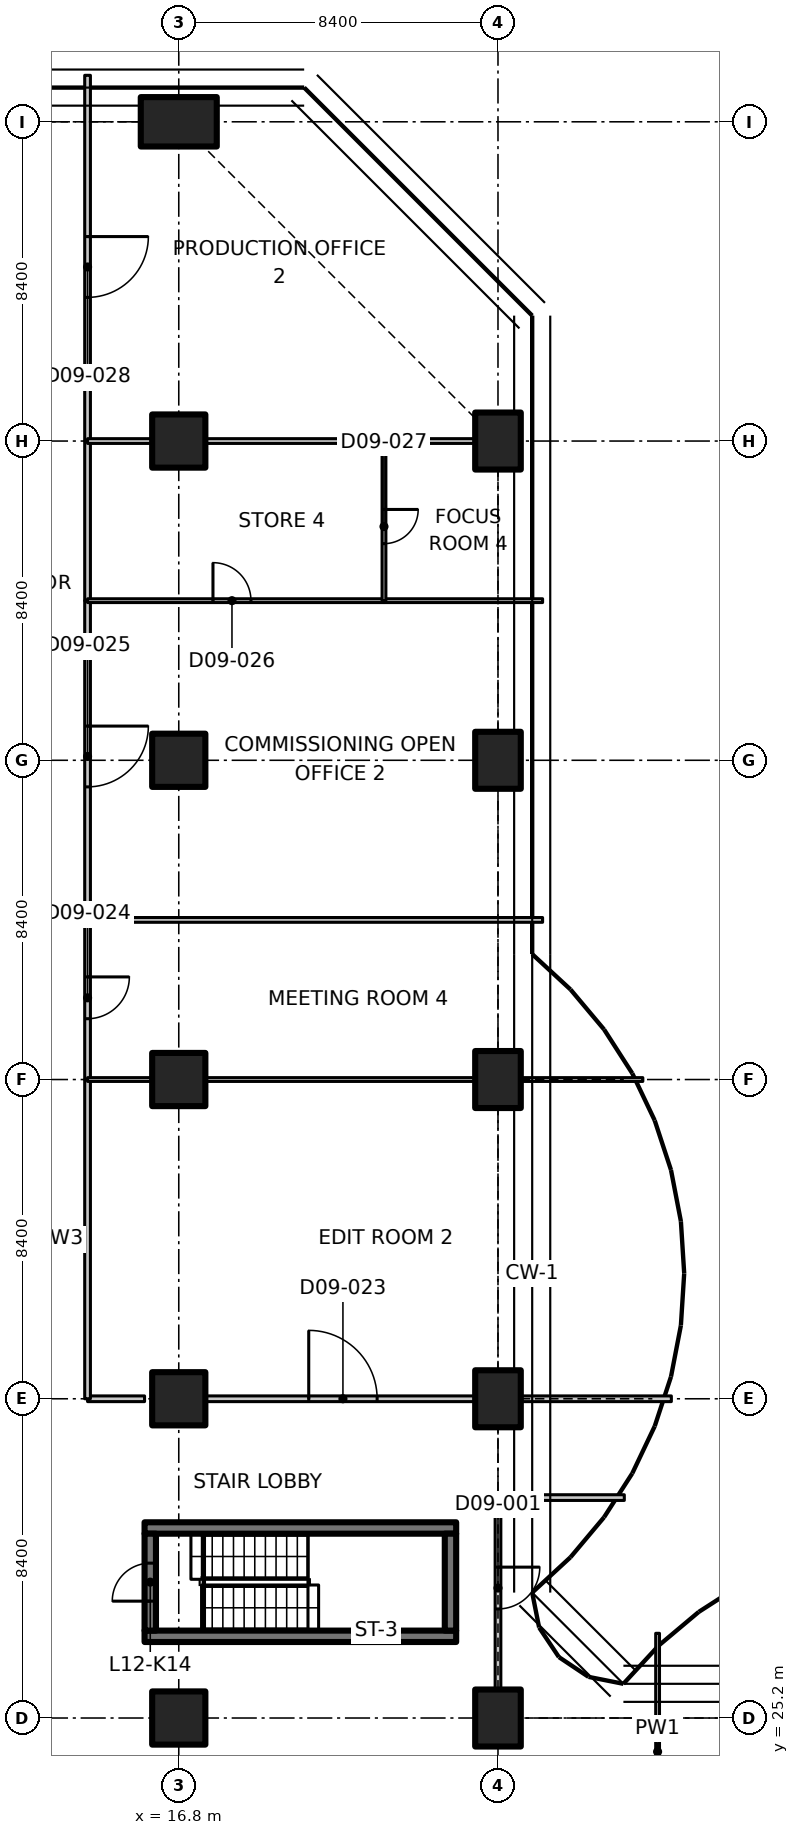
"""IFC4 building model, lengths in metres.
Left out: names, types, materials, properties, quantities, classifications, styles, units other than length and angle.
Written with IfcOpenShell. Run it as: python <this file> out.ifc"""

import sys

from ifc_helpers import new_model, si_unit, direction, frame, frame_2d, origin, origin_2d, place, context, subcontext, project, spatial, polyline, rectangle, outline, extrude, element, fill, save


model = new_model("IFC4")
c1 = context("Model", 3, precision=1e-05, world=origin(), true_north=direction((0.0, 1.0)))
c2 = subcontext(c1, "Body", "Model", "MODEL_VIEW")
j1 = project(units=[si_unit("LENGTHUNIT", "METRE"), si_unit("PLANEANGLEUNIT", "RADIAN")], contexts=[c1])
p1 = place(None, origin())
s1 = spatial("IfcSite", under=j1, at=p1, CompositionType="ELEMENT")
p2 = place(p1, origin())
s2 = spatial("IfcBuilding", under=s1, at=p2, CompositionType="ELEMENT")
p3 = place(p2, frame((0.0, 0.0, 58.1)))
s3 = spatial("IfcBuildingStorey", under=s2, at=p3, CompositionType="ELEMENT", Elevation=58.1)
for number, where, z_axis, x_axis in (
    (1, (16.8, 25.2, 0.0), (0.0, 0.0, 1.0), (1.0, 0.0, 0.0)),
    (2, (16.8, 33.6, 0.0), (0.0, 0.0, 1.0), (1.0, 0.0, 0.0)),
    (3, (16.8, 42.0, 0.0), (0.0, 0.0, 1.0), (1.0, 0.0, 0.0)),
    (4, (16.8, 50.4, 0.0), (0.0, 0.0, 1.0), (1.0, 0.0, 0.0)),
    (5, (16.8, 58.8, 0.0), (0.0, 0.0, 1.0), (1.0, 0.0, 0.0)),
):
    element("IfcColumn", number, at=place(p3, frame(where, z_axis=z_axis, x_axis=x_axis)), inside=s3, PredefinedType="COLUMN", context=c2, shape_type="SweptSolid", body=[
        extrude(rectangle(XDim=1.4, YDim=1.4, at=origin_2d()), origin(), (0.0, 0.0, 1.0), 3.35),
    ])
p4 = place(p3, frame((16.8, 67.2, 0.0), z_axis=(0.0, 0.0, 1.0), x_axis=(0.0, 1.0, 0.0)))
e6 = element("IfcColumn", 6, at=p4, inside=s3, PredefinedType="COLUMN", context=c2, shape_type="SweptSolid", body=[
    extrude(rectangle(XDim=1.3, YDim=2.0, at=origin_2d()), origin(), (0.0, 0.0, 1.0), 3.35),
])
for number, where, z_axis, x_axis in (
    (7, (25.2, 25.2, 0.0), (0.0, 0.0, 1.0), (1.0, 0.0, 0.0)),
    (8, (25.2, 33.6, 0.0), (0.0, 0.0, 1.0), (1.0, 0.0, 0.0)),
    (9, (25.2, 42.0, 0.0), (0.0, 0.0, 1.0), (1.0, 0.0, 0.0)),
    (10, (25.2, 50.4, 0.0), (0.0, 0.0, 1.0), (1.0, 0.0, 0.0)),
    (11, (25.2, 58.8, 0.0), (0.0, 0.0, 1.0), (1.0, 0.0, 0.0)),
):
    element("IfcColumn", number, at=place(p3, frame(where, z_axis=z_axis, x_axis=x_axis)), inside=s3, PredefinedType="COLUMN", context=c2, shape_type="SweptSolid", body=[
        extrude(rectangle(XDim=1.2, YDim=1.5, at=origin_2d()), origin(), (0.0, 0.0, 1.0), 3.35),
    ])
for number, where, z_axis, x_axis in (
    (12, (15.9, 27.35, 0.0), (0.0, 0.0, 1.0), (1.0, 0.0, 0.0)),
    (13, (15.9, 30.2, 0.0), (0.0, 0.0, 1.0), (1.0, 0.0, 0.0)),
):
    element("IfcWall", number, at=place(p3, frame(where, z_axis=z_axis, x_axis=x_axis)), inside=s3, PredefinedType="SHEAR", context=c2, shape_type="SweptSolid", body=[
        extrude(rectangle(XDim=8.2, YDim=0.3, at=frame_2d((4.1, 0.0))), origin(), (0.0, 0.0, 1.0), 3.35),
    ])
p5 = place(p3, frame((16.05, 27.5, 0.0), z_axis=(0.0, 0.0, 1.0), x_axis=(0.0, 1.0, 0.0)))
e14 = element("IfcWall", 14, at=p5, inside=s3, PredefinedType="SHEAR", context=c2, shape_type="SweptSolid", body=[
    extrude(rectangle(XDim=2.55, YDim=0.3, at=frame_2d((1.275, 0.0))), origin(), (0.0, 0.0, 1.0), 3.35),
])
p6 = place(p5, frame((0.775, 0.0, 0.0)))
e15 = element("IfcOpeningElement", 15, at=p6, cuts=e14, PredefinedType="OPENING", context=c2, shape_type="SweptSolid", body=[
    extrude(rectangle(XDim=1.0, YDim=2.1, at=frame_2d((0.5, 1.05))), frame((0.0, 0.16, 0.0), z_axis=(0.0, -1.0, 0.0), x_axis=(1.0, 0.0, 0.0)), (0.0, 0.0, 1.0), 0.32),
])
p7 = place(p3, frame((23.95, 27.5, 0.0), z_axis=(0.0, 0.0, 1.0), x_axis=(0.0, 1.0, 0.0)))
e16 = element("IfcWall", 16, at=p7, inside=s3, PredefinedType="SHEAR", context=c2, shape_type="SweptSolid", body=[
    extrude(rectangle(XDim=2.55, YDim=0.3, at=frame_2d((1.275, 0.0))), origin(), (0.0, 0.0, 1.0), 3.35),
])
p8 = place(p3, frame((29.4, 27.429, 0.0), z_axis=(0.0, 0.0, 1.0), x_axis=(0.0, -1.0, 0.0)))
e17 = element("IfcWall", 17, at=p8, inside=s3, PredefinedType="PARTITIONING", context=c2, shape_type="SweptSolid", body=[
    extrude(outline(polyline([(0.0, 0.0), (6.229, 0.0), (6.229, 3.33), (2.679, 3.33), (2.677, 2.98), (1.781, 2.98), (1.779, 3.33), (0.154, 3.33), (0.0, 3.33), (0.0, 0.0)])), frame((0.0, 0.05, 0.0), z_axis=(0.0, -1.0, 0.0), x_axis=(1.0, 0.0, 0.0)), (0.0, 0.0, 1.0), 0.1),
])
p9 = place(p3, frame((25.2, 31.0, 0.0), z_axis=(0.0, 0.0, 1.0), x_axis=(0.0, -1.0, 0.0)))
e18 = element("IfcWall", 18, at=p9, inside=s3, PredefinedType="PARTITIONING", context=c2, shape_type="SweptSolid", body=[
    extrude(outline(polyline([(0.0, 0.0), (5.03, 0.0), (5.03, 2.98), (0.0, 2.98), (0.0, 0.0)])), frame((0.0, 0.075, 0.0), z_axis=(0.0, -1.0, 0.0), x_axis=(1.0, 0.0, 0.0)), (0.0, 0.0, 1.0), 0.15),
])
p10 = place(p9, frame((1.83, 0.0, 0.0)))
e19 = element("IfcOpeningElement", 19, at=p10, cuts=e18, PredefinedType="OPENING", context=c2, shape_type="SweptSolid", body=[
    extrude(rectangle(XDim=1.1, YDim=2.1, at=frame_2d((0.55, 1.05))), frame((0.0, 0.085, 0.0), z_axis=(0.0, -1.0, 0.0), x_axis=(1.0, 0.0, 0.0)), (0.0, 0.0, 1.0), 0.17),
])
p11 = place(p3, frame((25.2, 31.0, 0.0), z_axis=(0.0, 0.0, 1.0), x_axis=(1.0, 0.0, 0.0)))
e20 = element("IfcWall", 20, at=p11, inside=s3, PredefinedType="PARTITIONING", context=c2, shape_type="SweptSolid", body=[
    extrude(rectangle(XDim=3.324, YDim=0.15, at=frame_2d((1.662, 0.0))), origin(), (0.0, 0.0, 1.0), 2.98),
])
p12 = place(p3, frame((14.4, 33.6, 0.0), z_axis=(0.0, 0.0, 1.0), x_axis=(1.0, 0.0, 0.0)))
e21 = element("IfcWall", 21, at=p12, inside=s3, PredefinedType="PARTITIONING", context=c2, shape_type="SweptSolid", body=[
    extrude(rectangle(XDim=1.5, YDim=0.15, at=frame_2d((0.75, 0.0))), origin(), (0.0, 0.0, 1.0), 3.33),
])
p13 = place(p3, frame((17.52, 33.6, 0.0), z_axis=(0.0, 0.0, 1.0), x_axis=(1.0, 0.0, 0.0)))
e22 = element("IfcWall", 22, at=p13, inside=s3, PredefinedType="PARTITIONING", context=c2, shape_type="SweptSolid", body=[
    extrude(rectangle(XDim=7.06, YDim=0.15, at=frame_2d((3.53, 0.0))), origin(), (0.0, 0.0, 1.0), 3.33),
])
p14 = place(p13, frame((2.7, 0.0, 0.0)))
e23 = element("IfcOpeningElement", 23, at=p14, cuts=e22, PredefinedType="OPENING", context=c2, shape_type="SweptSolid", body=[
    extrude(rectangle(XDim=1.8, YDim=2.1, at=frame_2d((0.9, 1.05))), frame((0.0, 0.085, 0.0), z_axis=(0.0, -1.0, 0.0), x_axis=(1.0, 0.0, 0.0)), (0.0, 0.0, 1.0), 0.17),
])
p15 = place(p3, frame((25.82, 33.6, 0.0), z_axis=(0.0, 0.0, 1.0), x_axis=(1.0, 0.0, 0.0)))
e24 = element("IfcWall", 24, at=p15, inside=s3, PredefinedType="PARTITIONING", context=c2, shape_type="SweptSolid", body=[
    extrude(rectangle(XDim=3.942, YDim=0.15, at=frame_2d((1.971, 0.0))), origin(), (0.0, 0.0, 1.0), 2.98),
])
p16 = place(p3, frame((14.4, 42.0, 0.0), z_axis=(0.0, 0.0, 1.0), x_axis=(0.0, -1.0, 0.0)))
e25 = element("IfcWall", 25, at=p16, inside=s3, PredefinedType="PARTITIONING", context=c2, shape_type="SweptSolid", body=[
    extrude(rectangle(XDim=8.4, YDim=0.15, at=frame_2d((4.2, 0.0))), origin(), (0.0, 0.0, 1.0), 3.33),
])
p17 = place(p3, frame((14.4, 46.2, 0.0), z_axis=(0.0, 0.0, 1.0), x_axis=(0.0, -1.0, 0.0)))
e26 = element("IfcWall", 26, at=p17, inside=s3, PredefinedType="PARTITIONING", context=c2, shape_type="SweptSolid", body=[
    extrude(rectangle(XDim=4.2, YDim=0.15, at=frame_2d((2.1, 0.0))), origin(), (0.0, 0.0, 1.0), 3.33),
])
p18 = place(p17, frame((1.5, 0.0, 0.0)))
e27 = element("IfcOpeningElement", 27, at=p18, cuts=e26, PredefinedType="OPENING", context=c2, shape_type="SweptSolid", body=[
    extrude(rectangle(XDim=1.1, YDim=2.1, at=frame_2d((0.55, 1.05))), frame((0.0, 0.085, 0.0), z_axis=(0.0, -1.0, 0.0), x_axis=(1.0, 0.0, 0.0)), (0.0, 0.0, 1.0), 0.17),
])
p19 = place(p3, frame((14.4, 54.6, 0.0), z_axis=(0.0, 0.0, 1.0), x_axis=(0.0, -1.0, 0.0)))
e28 = element("IfcWall", 28, at=p19, inside=s3, PredefinedType="PARTITIONING", context=c2, shape_type="SweptSolid", body=[
    extrude(rectangle(XDim=8.4, YDim=0.15, at=frame_2d((4.2, 0.0))), origin(), (0.0, 0.0, 1.0), 3.33),
])
p20 = place(p19, frame((3.3, 0.0, 0.0)))
e29 = element("IfcOpeningElement", 29, at=p20, cuts=e28, PredefinedType="OPENING", context=c2, shape_type="SweptSolid", body=[
    extrude(rectangle(XDim=1.6, YDim=2.1, at=frame_2d((0.8, 1.05))), frame((0.0, 0.085, 0.0), z_axis=(0.0, -1.0, 0.0), x_axis=(1.0, 0.0, 0.0)), (0.0, 0.0, 1.0), 0.17),
])
p21 = place(p3, frame((14.4, 58.8, 0.0), z_axis=(0.0, 0.0, 1.0), x_axis=(0.0, -1.0, 0.0)))
e30 = element("IfcWall", 30, at=p21, inside=s3, PredefinedType="PARTITIONING", context=c2, shape_type="SweptSolid", body=[
    extrude(rectangle(XDim=4.2, YDim=0.15, at=frame_2d((2.1, 0.0))), origin(), (0.0, 0.0, 1.0), 3.33),
])
p22 = place(p3, frame((14.4, 68.423, 0.0), z_axis=(0.0, 0.0, 1.0), x_axis=(0.0, -1.0, 0.0)))
e31 = element("IfcWall", 31, at=p22, inside=s3, PredefinedType="PARTITIONING", context=c2, shape_type="SweptSolid", body=[
    extrude(outline(polyline([(0.0, 0.0), (9.623, 0.0), (9.623, 3.33), (1.673, 3.33), (1.671, 2.98), (0.775, 2.98), (0.773, 3.33), (0.143, 3.33), (0.0, 3.33), (0.0, 0.0)])), frame((0.0, 0.075, 0.0), z_axis=(0.0, -1.0, 0.0), x_axis=(1.0, 0.0, 0.0)), (0.0, 0.0, 1.0), 0.15),
])
p23 = place(p22, frame((4.243, 0.0, 0.0)))
e32 = element("IfcOpeningElement", 32, at=p23, cuts=e31, PredefinedType="OPENING", context=c2, shape_type="SweptSolid", body=[
    extrude(rectangle(XDim=1.6, YDim=2.1, at=frame_2d((0.8, 1.05))), frame((0.0, 0.085, 0.0), z_axis=(0.0, -1.0, 0.0), x_axis=(1.0, 0.0, 0.0)), (0.0, 0.0, 1.0), 0.17),
])
p24 = place(p3, frame((14.4, 42.0, 0.0), z_axis=(0.0, 0.0, 1.0), x_axis=(1.0, 0.0, 0.0)))
e33 = element("IfcWall", 33, at=p24, inside=s3, PredefinedType="PARTITIONING", context=c2, shape_type="SweptSolid", body=[
    extrude(rectangle(XDim=1.68, YDim=0.1, at=frame_2d((0.84, 0.0))), origin(), (0.0, 0.0, 1.0), 3.33),
])
p25 = place(p3, frame((17.52, 42.0, 0.0), z_axis=(0.0, 0.0, 1.0), x_axis=(1.0, 0.0, 0.0)))
e34 = element("IfcWall", 34, at=p25, inside=s3, PredefinedType="PARTITIONING", context=c2, shape_type="SweptSolid", body=[
    extrude(rectangle(XDim=7.06, YDim=0.1, at=frame_2d((3.53, 0.0))), origin(), (0.0, 0.0, 1.0), 3.33),
])
p26 = place(p3, frame((25.82, 42.0, 0.0), z_axis=(0.0, 0.0, 1.0), x_axis=(1.0, 0.0, 0.0)))
e35 = element("IfcWall", 35, at=p26, inside=s3, PredefinedType="PARTITIONING", context=c2, shape_type="SweptSolid", body=[
    extrude(rectangle(XDim=3.191, YDim=0.1, at=frame_2d((1.596, 0.0))), origin(), (0.0, 0.0, 1.0), 2.98),
])
p27 = place(p3, frame((14.4, 46.2, 0.0), z_axis=(0.0, 0.0, 1.0), x_axis=(1.0, 0.0, 0.0)))
e36 = element("IfcWall", 36, at=p27, inside=s3, PredefinedType="PARTITIONING", context=c2, shape_type="SweptSolid", body=[
    extrude(outline(polyline([(0.0, 0.0), (11.974, 0.0), (11.974, 3.33), (11.9, 3.33), (11.25, 3.33), (11.248, 2.98), (10.352, 2.98), (10.35, 3.33), (0.0, 3.33), (0.0, 0.0)])), frame((0.0, 0.062, 0.0), z_axis=(0.0, -1.0, 0.0), x_axis=(1.0, 0.0, 0.0)), (0.0, 0.0, 1.0), 0.125),
])
p28 = place(p3, frame((14.4, 54.6, 0.0), z_axis=(0.0, 0.0, 1.0), x_axis=(1.0, 0.0, 0.0)))
e37 = element("IfcWall", 37, at=p28, inside=s3, PredefinedType="PARTITIONING", context=c2, shape_type="SweptSolid", body=[
    extrude(rectangle(XDim=7.8, YDim=0.1, at=frame_2d((3.9, 0.0))), origin(), (0.0, 0.0, 1.0), 3.33),
])
p29 = place(p28, frame((3.3, 0.0, 0.0)))
e38 = element("IfcOpeningElement", 38, at=p29, cuts=e37, PredefinedType="OPENING", context=c2, shape_type="SweptSolid", body=[
    extrude(rectangle(XDim=1.0, YDim=2.1, at=frame_2d((0.5, 1.05))), frame((0.0, 0.06, 0.0), z_axis=(0.0, -1.0, 0.0), x_axis=(1.0, 0.0, 0.0)), (0.0, 0.0, 1.0), 0.12),
])
p30 = place(p3, frame((22.2, 54.6, 0.0), z_axis=(0.0, 0.0, 1.0), x_axis=(1.0, 0.0, 0.0)))
e39 = element("IfcWall", 39, at=p30, inside=s3, PredefinedType="PARTITIONING", context=c2, shape_type="SweptSolid", body=[
    extrude(rectangle(XDim=4.174, YDim=0.1, at=frame_2d((2.087, 0.0))), origin(), (0.0, 0.0, 1.0), 2.98),
])
p31 = place(p3, frame((22.2, 58.8, 0.0), z_axis=(0.0, 0.0, 1.0), x_axis=(0.0, -1.0, 0.0)))
e40 = element("IfcWall", 40, at=p31, inside=s3, PredefinedType="PARTITIONING", context=c2, shape_type="SweptSolid", body=[
    extrude(rectangle(XDim=4.2, YDim=0.1, at=frame_2d((2.1, 0.0))), origin(), (0.0, 0.0, 1.0), 3.33),
])
p32 = place(p31, frame((1.8, 0.0, 0.0)))
e41 = element("IfcOpeningElement", 41, at=p32, cuts=e40, PredefinedType="OPENING", context=c2, shape_type="SweptSolid", body=[
    extrude(rectangle(XDim=0.9, YDim=2.1, at=frame_2d((0.45, 1.05))), frame((0.0, 0.06, 0.0), z_axis=(0.0, -1.0, 0.0), x_axis=(1.0, 0.0, 0.0)), (0.0, 0.0, 1.0), 0.12),
])
p33 = place(p3, frame((14.4, 58.8, 0.0), z_axis=(0.0, 0.0, 1.0), x_axis=(1.0, 0.0, 0.0)))
e42 = element("IfcWall", 42, at=p33, inside=s3, PredefinedType="PARTITIONING", context=c2, shape_type="SweptSolid", body=[
    extrude(rectangle(XDim=1.68, YDim=0.125, at=frame_2d((0.84, 0.0))), origin(), (0.0, 0.0, 1.0), 3.33),
])
p34 = place(p3, frame((17.52, 58.8, 0.0), z_axis=(0.0, 0.0, 1.0), x_axis=(1.0, 0.0, 0.0)))
e43 = element("IfcWall", 43, at=p34, inside=s3, PredefinedType="PARTITIONING", context=c2, shape_type="SweptSolid", body=[
    extrude(rectangle(XDim=4.68, YDim=0.125, at=frame_2d((2.34, 0.0))), origin(), (0.0, 0.0, 1.0), 3.33),
])
p35 = place(p3, frame((22.2, 58.8, 0.0), z_axis=(0.0, 0.0, 1.0), x_axis=(1.0, 0.0, 0.0)))
e44 = element("IfcWall", 44, at=p35, inside=s3, PredefinedType="PARTITIONING", context=c2, shape_type="SweptSolid", body=[
    extrude(rectangle(XDim=2.38, YDim=0.125, at=frame_2d((1.19, 0.0))), origin(), (0.0, 0.0, 1.0), 3.33),
])
p36 = place(p6, origin())
e45 = element("IfcDoor", 45, at=p36, inside=s3, OperationType="SINGLE_SWING_LEFT", PredefinedType="DOOR", context=c2, shape_type="SweptSolid", body=[
    extrude(rectangle(XDim=1.0, YDim=2.1, at=frame_2d((0.5, 1.05))), frame((0.0, 0.025, 0.0), z_axis=(0.0, -1.0, 0.0), x_axis=(1.0, 0.0, 0.0)), (0.0, 0.0, 1.0), 0.05),
])
fill(e15, e45)
p37 = place(p10, origin())
e46 = element("IfcDoor", 46, at=p37, inside=s3, OperationType="SINGLE_SWING_RIGHT", PredefinedType="DOOR", context=c2, shape_type="SweptSolid", body=[
    extrude(rectangle(XDim=1.1, YDim=2.1, at=frame_2d((0.55, 1.05))), frame((0.0, 0.025, 0.0), z_axis=(0.0, -1.0, 0.0), x_axis=(1.0, 0.0, 0.0)), (0.0, 0.0, 1.0), 0.05),
])
fill(e19, e46)
p38 = place(p14, origin())
e47 = element("IfcDoor", 47, at=p38, inside=s3, OperationType="DOUBLE_DOOR_SINGLE_SWING", PredefinedType="DOOR", context=c2, shape_type="SweptSolid", body=[
    extrude(rectangle(XDim=1.8, YDim=2.1, at=frame_2d((0.9, 1.05))), frame((0.0, 0.025, 0.0), z_axis=(0.0, -1.0, 0.0), x_axis=(1.0, 0.0, 0.0)), (0.0, 0.0, 1.0), 0.05),
])
fill(e23, e47)
p39 = place(p18, origin())
e48 = element("IfcDoor", 48, at=p39, inside=s3, OperationType="SINGLE_SWING_LEFT", PredefinedType="DOOR", context=c2, shape_type="SweptSolid", body=[
    extrude(rectangle(XDim=1.1, YDim=2.1, at=frame_2d((0.55, 1.05))), frame((0.0, 0.025, 0.0), z_axis=(0.0, -1.0, 0.0), x_axis=(1.0, 0.0, 0.0)), (0.0, 0.0, 1.0), 0.05),
])
fill(e27, e48)
p40 = place(p20, origin())
e49 = element("IfcDoor", 49, at=p40, inside=s3, OperationType="DOUBLE_DOOR_SINGLE_SWING", PredefinedType="DOOR", context=c2, shape_type="SweptSolid", body=[
    extrude(rectangle(XDim=1.6, YDim=2.1, at=frame_2d((0.8, 1.05))), frame((0.0, 0.025, 0.0), z_axis=(0.0, -1.0, 0.0), x_axis=(1.0, 0.0, 0.0)), (0.0, 0.0, 1.0), 0.05),
])
fill(e29, e49)
p41 = place(p29, origin())
e50 = element("IfcDoor", 50, at=p41, inside=s3, OperationType="SINGLE_SWING_LEFT", PredefinedType="DOOR", context=c2, shape_type="SweptSolid", body=[
    extrude(rectangle(XDim=1.0, YDim=2.1, at=frame_2d((0.5, 1.05))), frame((0.0, 0.025, 0.0), z_axis=(0.0, -1.0, 0.0), x_axis=(1.0, 0.0, 0.0)), (0.0, 0.0, 1.0), 0.05),
])
fill(e38, e50)
p42 = place(p32, origin())
e51 = element("IfcDoor", 51, at=p42, inside=s3, OperationType="SINGLE_SWING_LEFT", PredefinedType="DOOR", context=c2, shape_type="SweptSolid", body=[
    extrude(rectangle(XDim=0.9, YDim=2.1, at=frame_2d((0.45, 1.05))), frame((0.0, 0.025, 0.0), z_axis=(0.0, -1.0, 0.0), x_axis=(1.0, 0.0, 0.0)), (0.0, 0.0, 1.0), 0.05),
])
fill(e41, e51)
p43 = place(p23, origin())
e52 = element("IfcDoor", 52, at=p43, inside=s3, OperationType="DOUBLE_DOOR_SINGLE_SWING", PredefinedType="DOOR", context=c2, shape_type="SweptSolid", body=[
    extrude(rectangle(XDim=1.6, YDim=2.1, at=frame_2d((0.8, 1.05))), frame((0.0, 0.025, 0.0), z_axis=(0.0, -1.0, 0.0), x_axis=(1.0, 0.0, 0.0)), (0.0, 0.0, 1.0), 0.05),
])
fill(e32, e52)
save(model, sys.argv[1])
